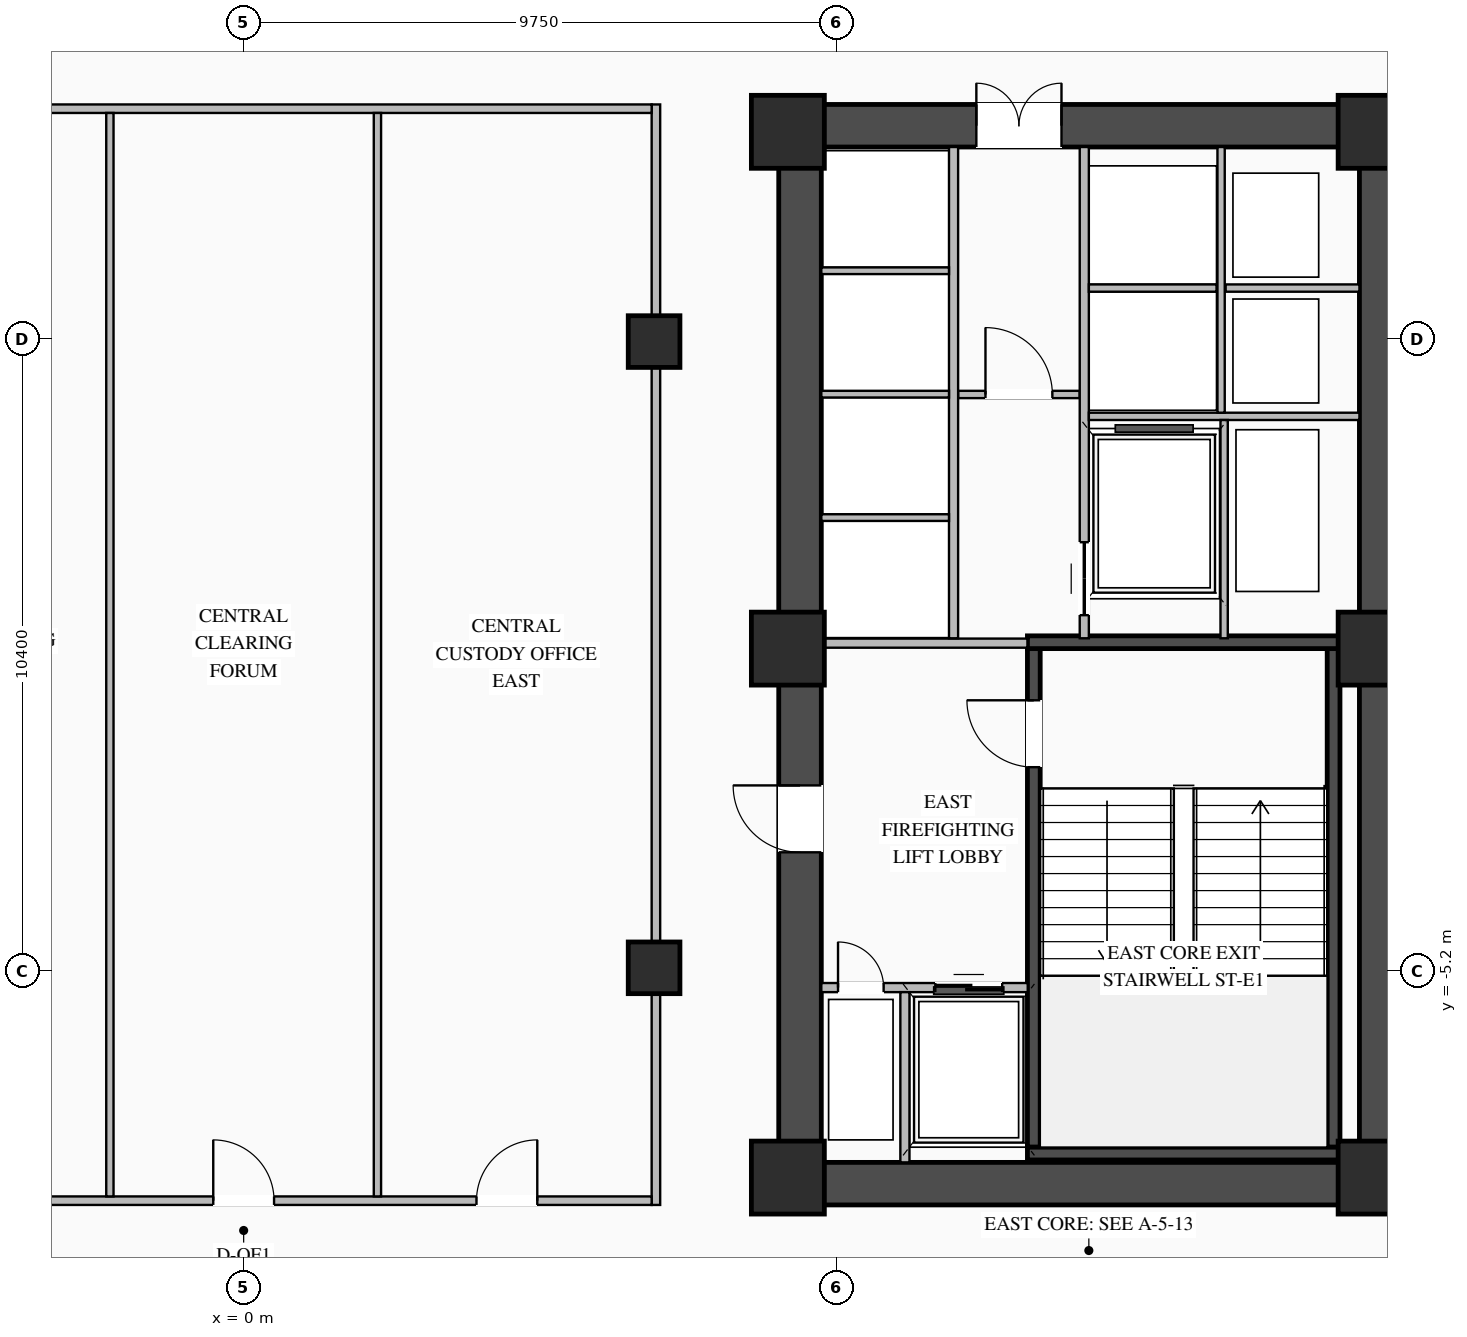
"""IFC4 building model, lengths in metres.
Left out: names, types, materials, properties, quantities, classifications, styles, units other than length and angle.
Written with IfcOpenShell. Run it as: python <this file> out.ifc"""

import sys

from ifc_helpers import new_model, si_unit, direction, frame, frame_2d, origin, origin_2d, place, context, subcontext, project, spatial, rectangle, i_section, extrude, element, fill, save


model = new_model("IFC4")
c1 = context("Model", 3, precision=1e-05, world=origin(), true_north=direction((0.0, 1.0)))
c2 = subcontext(c1, "Body", "Model", "MODEL_VIEW")
j1 = project(units=[si_unit("LENGTHUNIT", "METRE"), si_unit("PLANEANGLEUNIT", "RADIAN")], contexts=[c1])
p1 = place(None, origin())
s1 = spatial("IfcSite", under=j1, at=p1, CompositionType="ELEMENT")
p2 = place(p1, origin())
s2 = spatial("IfcBuilding", under=s1, at=p2, CompositionType="ELEMENT")
p3 = place(p2, frame((0.0, 0.0, 65.7)))
s3 = spatial("IfcBuildingStorey", under=s2, at=p3, CompositionType="ELEMENT", Elevation=65.7)
p4 = place(p3, frame((8.8, -8.7, 0.0), z_axis=(0.0, 0.0, 1.0), x_axis=(1.0, 0.0, 0.0)))
e1 = element("IfcWall", 1, at=p4, inside=s3, PredefinedType="SHEAR", context=c2, shape_type="SweptSolid", body=[
    extrude(rectangle(XDim=10.25, YDim=0.7, at=frame_2d((5.125, 0.0))), origin(), (0.0, 0.0, 1.0), 4.02),
])
p5 = place(p3, frame((8.8, 8.7, 0.0), z_axis=(0.0, 0.0, 1.0), x_axis=(1.0, 0.0, 0.0)))
e2 = element("IfcWall", 2, at=p5, inside=s3, PredefinedType="SHEAR", context=c2, shape_type="SweptSolid", body=[
    extrude(rectangle(XDim=10.25, YDim=0.7, at=frame_2d((5.125, 0.0))), origin(), (0.0, 0.0, 1.0), 4.02),
])
p6 = place(p5, frame((3.25, 0.0, 0.0)))
e3 = element("IfcOpeningElement", 3, at=p6, cuts=e2, PredefinedType="OPENING", context=c2, shape_type="SweptSolid", body=[
    extrude(rectangle(XDim=1.4, YDim=2.05, at=frame_2d((0.7, 1.025))), frame((0.0, 0.36, 0.0), z_axis=(0.0, -1.0, 0.0), x_axis=(1.0, 0.0, 0.0)), (0.0, 0.0, 1.0), 0.72),
])
p7 = place(p3, frame((9.15, -8.35, 0.0), z_axis=(0.0, 0.0, 1.0), x_axis=(0.0, 1.0, 0.0)))
e4 = element("IfcWall", 4, at=p7, inside=s3, PredefinedType="SHEAR", context=c2, shape_type="SweptSolid", body=[
    extrude(rectangle(XDim=16.7, YDim=0.7, at=frame_2d((8.35, 0.0))), origin(), (0.0, 0.0, 1.0), 4.02),
])
p8 = place(p7, frame((5.1, 0.0, 0.0)))
e5 = element("IfcOpeningElement", 5, at=p8, cuts=e4, PredefinedType="OPENING", context=c2, shape_type="SweptSolid", body=[
    extrude(rectangle(XDim=1.1, YDim=2.08, at=frame_2d((0.55, 1.04))), frame((0.0, 0.36, 0.0), z_axis=(0.0, -1.0, 0.0), x_axis=(1.0, 0.0, 0.0)), (0.0, 0.0, 1.0), 0.72),
])
p9 = place(p3, frame((18.7, -8.35, 0.0), z_axis=(0.0, 0.0, 1.0), x_axis=(0.0, 1.0, 0.0)))
e6 = element("IfcWall", 6, at=p9, inside=s3, PredefinedType="SHEAR", context=c2, shape_type="SweptSolid", body=[
    extrude(rectangle(XDim=16.7, YDim=0.7, at=frame_2d((8.35, 0.0))), origin(), (0.0, 0.0, 1.0), 4.02),
])
p10 = place(p3, frame((12.995, -8.1, 0.0), z_axis=(0.0, 0.0, 1.0), x_axis=(0.0, 1.0, 0.0)))
e7 = element("IfcWall", 7, at=p10, inside=s3, PredefinedType="SHEAR", context=c2, shape_type="SweptSolid", body=[
    extrude(rectangle(XDim=8.2, YDim=0.21, at=frame_2d((4.1, 0.0))), origin(), (0.0, 0.0, 1.0), 4.02),
])
p11 = place(p10, frame((6.25, 0.0, 0.0)))
e8 = element("IfcOpeningElement", 8, at=p11, cuts=e7, PredefinedType="OPENING", context=c2, shape_type="SweptSolid", body=[
    extrude(rectangle(XDim=1.1, YDim=2.15, at=frame_2d((0.55, 1.075))), frame((0.0, 0.115, 0.0), z_axis=(0.0, -1.0, 0.0), x_axis=(1.0, 0.0, 0.0)), (0.0, 0.0, 1.0), 0.23),
])
p12 = place(p3, frame((17.925, -8.1, 0.0), z_axis=(0.0, 0.0, 1.0), x_axis=(0.0, 1.0, 0.0)))
e9 = element("IfcWall", 9, at=p12, inside=s3, PredefinedType="SHEAR", context=c2, shape_type="SweptSolid", body=[
    extrude(rectangle(XDim=8.2, YDim=0.21, at=frame_2d((4.1, 0.0))), origin(), (0.0, 0.0, 1.0), 4.02),
])
for number, where, z_axis, x_axis in (
    (10, (12.89, -8.205, 0.0), (0.0, 0.0, 1.0), (1.0, 0.0, 0.0)),
    (11, (18.03, 0.205, 0.0), (0.0, 0.0, 1.0), (-1.0, 0.0, 0.0)),
):
    element("IfcWall", number, at=place(p3, frame(where, z_axis=z_axis, x_axis=x_axis)), inside=s3, PredefinedType="SHEAR", context=c2, shape_type="SweptSolid", body=[
        extrude(rectangle(XDim=5.14, YDim=0.21, at=frame_2d((2.57, 0.0))), origin(), (0.0, 0.0, 1.0), 4.02),
    ])
for number, where, z_axis, x_axis in (
    (12, (8.95, -8.6, 0.0), (0.0, 0.0, 1.0), (1.0, 0.0, 0.0)),
    (13, (8.95, 0.1, 0.0), (0.0, 0.0, 1.0), (1.0, 0.0, 0.0)),
    (14, (8.95, 8.6, 0.0), (0.0, 0.0, 1.0), (1.0, 0.0, 0.0)),
    (15, (18.6, -8.6, 0.0), (0.0, 0.0, 1.0), (1.0, 0.0, 0.0)),
    (16, (18.6, 0.1, 0.0), (0.0, 0.0, 1.0), (1.0, 0.0, 0.0)),
    (17, (18.6, 8.6, 0.0), (0.0, 0.0, 1.0), (1.0, 0.0, 0.0)),
):
    element("IfcColumn", number, at=place(p3, frame(where, z_axis=z_axis, x_axis=x_axis)), inside=s3, PredefinedType="COLUMN", context=c2, shape_type="SweptSolid", body=[
        extrude(rectangle(XDim=1.2, YDim=1.2, at=origin_2d()), origin(), (0.0, 0.0, 1.0), 4.3),
    ])
for number, where, z_axis, x_axis in (
    (18, (6.75, -5.15, 0.0), (0.0, 0.0, 1.0), (1.0, 0.0, 0.0)),
    (19, (6.75, 5.15, 0.0), (0.0, 0.0, 1.0), (1.0, 0.0, 0.0)),
):
    element("IfcColumn", number, at=place(p3, frame(where, z_axis=z_axis, x_axis=x_axis)), inside=s3, PredefinedType="COLUMN", context=c2, shape_type="SweptSolid", body=[
        extrude(i_section(OverallWidth=0.85, OverallDepth=0.85, WebThickness=0.032, FlangeThickness=0.048, at=origin_2d()), origin(), (0.0, 0.0, 1.0), 4.3),
    ])
p13 = place(p3, frame((9.5, -5.475, 0.0), z_axis=(0.0, 0.0, 1.0), x_axis=(1.0, 0.0, 0.0)))
e20 = element("IfcWall", 20, at=p13, inside=s3, PredefinedType="STANDARD", context=c2, shape_type="SweptSolid", body=[
    extrude(rectangle(XDim=3.395, YDim=0.15, at=frame_2d((1.698, 0.0))), origin(), (0.0, 0.0, 1.0), 4.0),
])
p14 = place(p13, frame((1.875, 0.0, 0.0)))
e21 = element("IfcOpeningElement", 21, at=p14, cuts=e20, PredefinedType="OPENING", context=c2, shape_type="SweptSolid", body=[
    extrude(rectangle(XDim=1.1, YDim=2.15, at=frame_2d((0.55, 1.075))), frame((0.0, 0.085, 0.0), z_axis=(0.0, -1.0, 0.0), x_axis=(1.0, 0.0, 0.0)), (0.0, 0.0, 1.0), 0.17),
])
p15 = place(p13, frame((0.275, 0.0, 0.0)))
e22 = element("IfcOpeningElement", 22, at=p15, cuts=e20, PredefinedType="OPENING", context=c2, shape_type="SweptSolid", body=[
    extrude(rectangle(XDim=0.75, YDim=2.05, at=frame_2d((0.375, 1.025))), frame((0.0, 0.085, 0.0), z_axis=(0.0, -1.0, 0.0), x_axis=(1.0, 0.0, 0.0)), (0.0, 0.0, 1.0), 0.17),
])
p16 = place(p3, frame((10.875, -8.35, 0.0), z_axis=(0.0, 0.0, 1.0), x_axis=(0.0, 1.0, 0.0)))
e23 = element("IfcWall", 23, at=p16, inside=s3, PredefinedType="STANDARD", context=c2, shape_type="SweptSolid", body=[
    extrude(rectangle(XDim=2.8, YDim=0.15, at=frame_2d((1.4, 0.0))), origin(), (0.0, 0.0, 1.0), 4.0),
])
p17 = place(p3, frame((9.5, 0.19, 0.0), z_axis=(0.0, 0.0, 1.0), x_axis=(1.0, 0.0, 0.0)))
e24 = element("IfcWall", 24, at=p17, inside=s3, PredefinedType="STANDARD", context=c2, shape_type="SweptSolid", body=[
    extrude(rectangle(XDim=3.39, YDim=0.15, at=frame_2d((1.695, 0.0))), origin(), (0.0, 0.0, 1.0), 3.395),
])
p18 = place(p3, frame((11.75, 4.28, 0.0), z_axis=(0.0, 0.0, 1.0), x_axis=(1.0, 0.0, 0.0)))
e25 = element("IfcWall", 25, at=p18, inside=s3, PredefinedType="STANDARD", context=c2, shape_type="SweptSolid", body=[
    extrude(rectangle(XDim=2.0, YDim=0.12, at=frame_2d((1.0, 0.0))), origin(), (0.0, 0.0, 1.0), 4.0),
])
p19 = place(p18, frame((0.45, 0.0, 0.0)))
e26 = element("IfcOpeningElement", 26, at=p19, cuts=e25, PredefinedType="OPENING", context=c2, shape_type="SweptSolid", body=[
    extrude(rectangle(XDim=1.1, YDim=2.1, at=frame_2d((0.55, 1.05))), frame((0.0, 0.07, 0.0), z_axis=(0.0, -1.0, 0.0), x_axis=(1.0, 0.0, 0.0)), (0.0, 0.0, 1.0), 0.14),
])
p20 = place(p3, frame((11.675, 0.27, 0.0), z_axis=(0.0, 0.0, 1.0), x_axis=(0.0, 1.0, 0.0)))
e27 = element("IfcWall", 27, at=p20, inside=s3, PredefinedType="STANDARD", context=c2, shape_type="SweptSolid", body=[
    extrude(rectangle(XDim=8.08, YDim=0.15, at=frame_2d((4.04, 0.0))), origin(), (0.0, 0.0, 1.0), 4.0),
])
for number, where, z_axis, x_axis in (
    (28, (9.5, 2.255, 0.0), (0.0, 0.0, 1.0), (1.0, 0.0, 0.0)),
    (29, (9.5, 4.285, 0.0), (0.0, 0.0, 1.0), (1.0, 0.0, 0.0)),
    (30, (9.5, 6.315, 0.0), (0.0, 0.0, 1.0), (1.0, 0.0, 0.0)),
):
    element("IfcWall", number, at=place(p3, frame(where, z_axis=z_axis, x_axis=x_axis)), inside=s3, PredefinedType="STANDARD", context=c2, shape_type="SweptSolid", body=[
        extrude(rectangle(XDim=2.1, YDim=0.11, at=frame_2d((1.05, 0.0))), origin(), (0.0, 0.0, 1.0), 4.0),
    ])
p21 = place(p3, frame((13.825, 0.27, 0.0), z_axis=(0.0, 0.0, 1.0), x_axis=(0.0, 1.0, 0.0)))
e31 = element("IfcWall", 31, at=p21, inside=s3, PredefinedType="STANDARD", context=c2, shape_type="SweptSolid", body=[
    extrude(rectangle(XDim=8.08, YDim=0.15, at=frame_2d((4.04, 0.0))), origin(), (0.0, 0.0, 1.0), 4.0),
])
p22 = place(p21, frame((0.38, 0.0, 0.0)))
e32 = element("IfcOpeningElement", 32, at=p22, cuts=e31, PredefinedType="OPENING", context=c2, shape_type="SweptSolid", body=[
    extrude(rectangle(XDim=1.2, YDim=2.1, at=frame_2d((0.6, 1.05))), frame((0.0, 0.085, 0.0), z_axis=(0.0, -1.0, 0.0), x_axis=(1.0, 0.0, 0.0)), (0.0, 0.0, 1.0), 0.17),
])
p23 = place(p3, frame((13.9, 3.92, 0.0), z_axis=(0.0, 0.0, 1.0), x_axis=(1.0, 0.0, 0.0)))
e33 = element("IfcWall", 33, at=p23, inside=s3, PredefinedType="STANDARD", context=c2, shape_type="SweptSolid", body=[
    extrude(rectangle(XDim=4.45, YDim=0.12, at=frame_2d((2.225, 0.0))), origin(), (0.0, 0.0, 1.0), 4.0),
])
p24 = place(p3, frame((16.15, 6.03, 0.0), z_axis=(0.0, 0.0, 1.0), x_axis=(1.0, 0.0, 0.0)))
e34 = element("IfcWall", 34, at=p24, inside=s3, PredefinedType="STANDARD", context=c2, shape_type="SweptSolid", body=[
    extrude(rectangle(XDim=2.2, YDim=0.12, at=frame_2d((1.1, 0.0))), origin(), (0.0, 0.0, 1.0), 4.0),
])
p25 = place(p3, frame((16.075, 3.98, 0.0), z_axis=(0.0, 0.0, 1.0), x_axis=(0.0, 1.0, 0.0)))
e35 = element("IfcWall", 35, at=p25, inside=s3, PredefinedType="STANDARD", context=c2, shape_type="SweptSolid", body=[
    extrude(rectangle(XDim=4.37, YDim=0.12, at=frame_2d((2.185, 0.0))), origin(), (0.0, 0.0, 1.0), 4.0),
])
p26 = place(p3, frame((13.9, 6.03, 0.0), z_axis=(0.0, 0.0, 1.0), x_axis=(1.0, 0.0, 0.0)))
e36 = element("IfcWall", 36, at=p26, inside=s3, PredefinedType="STANDARD", context=c2, shape_type="SweptSolid", body=[
    extrude(rectangle(XDim=2.1, YDim=0.12, at=frame_2d((1.05, 0.0))), origin(), (0.0, 0.0, 1.0), 4.0),
])
p27 = place(p3, frame((16.125, 0.27, 0.0), z_axis=(0.0, 0.0, 1.0), x_axis=(0.0, 1.0, 0.0)))
e37 = element("IfcWall", 37, at=p27, inside=s3, PredefinedType="STANDARD", context=c2, shape_type="SweptSolid", body=[
    extrude(rectangle(XDim=3.59, YDim=0.12, at=frame_2d((1.795, 0.0))), origin(), (0.0, 0.0, 1.0), 4.0),
])
p28 = place(p3, frame((6.78, -9.05, 0.0), z_axis=(0.0, 0.0, 1.0), x_axis=(0.0, 1.0, 0.0)))
e38 = element("IfcWall", 38, at=p28, inside=s3, PredefinedType="STANDARD", context=c2, shape_type="SweptSolid", body=[
    extrude(rectangle(XDim=18.1, YDim=0.14, at=frame_2d((9.05, 0.0))), origin(), (0.0, 0.0, 1.0), 3.395),
])
p29 = place(p3, frame((-6.71, -8.98, 0.0), z_axis=(0.0, 0.0, 1.0), x_axis=(1.0, 0.0, 0.0)))
e39 = element("IfcWall", 39, at=p29, inside=s3, PredefinedType="STANDARD", context=c2, shape_type="SweptSolid", body=[
    extrude(rectangle(XDim=13.42, YDim=0.14, at=frame_2d((6.71, 0.0))), origin(), (0.0, 0.0, 1.0), 4.0),
])
p30 = place(p29, frame((1.881, 0.0, 0.0)))
e40 = element("IfcOpeningElement", 40, at=p30, cuts=e39, PredefinedType="OPENING", context=c2, shape_type="SweptSolid", body=[
    extrude(rectangle(XDim=1.0, YDim=2.08, at=frame_2d((0.5, 1.04))), frame((0.0, 0.08, 0.0), z_axis=(0.0, -1.0, 0.0), x_axis=(1.0, 0.0, 0.0)), (0.0, 0.0, 1.0), 0.16),
])
p31 = place(p29, frame((6.21, 0.0, 0.0)))
e41 = element("IfcOpeningElement", 41, at=p31, cuts=e39, PredefinedType="OPENING", context=c2, shape_type="SweptSolid", body=[
    extrude(rectangle(XDim=1.0, YDim=2.08, at=frame_2d((0.5, 1.04))), frame((0.0, 0.08, 0.0), z_axis=(0.0, -1.0, 0.0), x_axis=(1.0, 0.0, 0.0)), (0.0, 0.0, 1.0), 0.16),
])
p32 = place(p29, frame((10.539, 0.0, 0.0)))
e42 = element("IfcOpeningElement", 42, at=p32, cuts=e39, PredefinedType="OPENING", context=c2, shape_type="SweptSolid", body=[
    extrude(rectangle(XDim=1.0, YDim=2.08, at=frame_2d((0.5, 1.04))), frame((0.0, 0.08, 0.0), z_axis=(0.0, -1.0, 0.0), x_axis=(1.0, 0.0, 0.0)), (0.0, 0.0, 1.0), 0.16),
])
p33 = place(p3, frame((-6.71, 8.98, 0.0), z_axis=(0.0, 0.0, 1.0), x_axis=(1.0, 0.0, 0.0)))
e43 = element("IfcWall", 43, at=p33, inside=s3, PredefinedType="STANDARD", context=c2, shape_type="SweptSolid", body=[
    extrude(rectangle(XDim=13.42, YDim=0.14, at=frame_2d((6.71, 0.0))), origin(), (0.0, 0.0, 1.0), 4.0),
])
for number, where, z_axis, x_axis in (
    (44, (-2.2, -8.91, 0.0), (0.0, 0.0, 1.0), (0.0, 1.0, 0.0)),
    (45, (2.2, -8.91, 0.0), (0.0, 0.0, 1.0), (0.0, 1.0, 0.0)),
):
    element("IfcWall", number, at=place(p3, frame(where, z_axis=z_axis, x_axis=x_axis)), inside=s3, PredefinedType="STANDARD", context=c2, shape_type="SweptSolid", body=[
        extrude(rectangle(XDim=17.82, YDim=0.12, at=frame_2d((8.91, 0.0))), origin(), (0.0, 0.0, 1.0), 4.0),
    ])
p34 = place(p11, origin())
e46 = element("IfcDoor", 46, at=p34, inside=s3, OperationType="SINGLE_SWING_RIGHT", PredefinedType="DOOR", context=c2, shape_type="SweptSolid", body=[
    extrude(rectangle(XDim=1.1, YDim=2.15, at=frame_2d((0.55, 1.075))), frame((0.0, 0.025, 0.0), z_axis=(0.0, -1.0, 0.0), x_axis=(1.0, 0.0, 0.0)), (0.0, 0.0, 1.0), 0.05),
])
fill(e8, e46)
p35 = place(p14, origin())
e47 = element("IfcDoor", 47, at=p35, inside=s3, OperationType="DOUBLE_DOOR_SLIDING", PredefinedType="DOOR", context=c2, shape_type="SweptSolid", body=[
    extrude(rectangle(XDim=1.1, YDim=2.15, at=frame_2d((0.55, 1.075))), frame((0.0, 0.025, 0.0), z_axis=(0.0, -1.0, 0.0), x_axis=(1.0, 0.0, 0.0)), (0.0, 0.0, 1.0), 0.05),
])
fill(e21, e47)
p36 = place(p15, origin())
e48 = element("IfcDoor", 48, at=p36, inside=s3, OperationType="SINGLE_SWING_LEFT", PredefinedType="DOOR", context=c2, shape_type="SweptSolid", body=[
    extrude(rectangle(XDim=0.75, YDim=2.05, at=frame_2d((0.375, 1.025))), frame((0.0, 0.025, 0.0), z_axis=(0.0, -1.0, 0.0), x_axis=(1.0, 0.0, 0.0)), (0.0, 0.0, 1.0), 0.05),
])
fill(e22, e48)
p37 = place(p8, origin())
e49 = element("IfcDoor", 49, at=p37, inside=s3, OperationType="SINGLE_SWING_RIGHT", PredefinedType="DOOR", context=c2, shape_type="SweptSolid", body=[
    extrude(rectangle(XDim=1.1, YDim=2.08, at=frame_2d((0.55, 1.04))), frame((0.0, -0.255, 0.0), z_axis=(0.0, -1.0, 0.0), x_axis=(1.0, 0.0, 0.0)), (0.0, 0.0, 1.0), 0.05),
])
fill(e5, e49)
p38 = place(p19, origin())
e50 = element("IfcDoor", 50, at=p38, inside=s3, OperationType="SINGLE_SWING_LEFT", PredefinedType="DOOR", context=c2, shape_type="SweptSolid", body=[
    extrude(rectangle(XDim=1.1, YDim=2.1, at=frame_2d((0.55, 1.05))), frame((0.0, 0.025, 0.0), z_axis=(0.0, -1.0, 0.0), x_axis=(1.0, 0.0, 0.0)), (0.0, 0.0, 1.0), 0.05),
])
fill(e26, e50)
p39 = place(p6, origin())
e51 = element("IfcDoor", 51, at=p39, inside=s3, OperationType="DOUBLE_DOOR_SINGLE_SWING", PredefinedType="DOOR", context=c2, shape_type="SweptSolid", body=[
    extrude(rectangle(XDim=1.4, YDim=2.05, at=frame_2d((0.7, 1.025))), frame((0.0, 0.295, 0.0), z_axis=(0.0, -1.0, 0.0), x_axis=(1.0, 0.0, 0.0)), (0.0, 0.0, 1.0), 0.05),
])
fill(e3, e51)
p40 = place(p22, origin())
e52 = element("IfcDoor", 52, at=p40, inside=s3, OperationType="DOUBLE_DOOR_SLIDING", PredefinedType="DOOR", context=c2, shape_type="SweptSolid", body=[
    extrude(rectangle(XDim=1.2, YDim=2.1, at=frame_2d((0.6, 1.05))), frame((0.0, 0.025, 0.0), z_axis=(0.0, -1.0, 0.0), x_axis=(1.0, 0.0, 0.0)), (0.0, 0.0, 1.0), 0.05),
])
fill(e32, e52)
p41 = place(p31, origin())
e53 = element("IfcDoor", 53, at=p41, inside=s3, OperationType="SINGLE_SWING_LEFT", PredefinedType="DOOR", context=c2, shape_type="SweptSolid", body=[
    extrude(rectangle(XDim=1.0, YDim=2.08, at=frame_2d((0.5, 1.04))), frame((0.0, 0.025, 0.0), z_axis=(0.0, -1.0, 0.0), x_axis=(1.0, 0.0, 0.0)), (0.0, 0.0, 1.0), 0.05),
])
fill(e41, e53)
p42 = place(p32, origin())
e54 = element("IfcDoor", 54, at=p42, inside=s3, OperationType="SINGLE_SWING_RIGHT", PredefinedType="DOOR", context=c2, shape_type="SweptSolid", body=[
    extrude(rectangle(XDim=1.0, YDim=2.08, at=frame_2d((0.5, 1.04))), frame((0.0, 0.025, 0.0), z_axis=(0.0, -1.0, 0.0), x_axis=(1.0, 0.0, 0.0)), (0.0, 0.0, 1.0), 0.05),
])
fill(e42, e54)
save(model, sys.argv[1])
